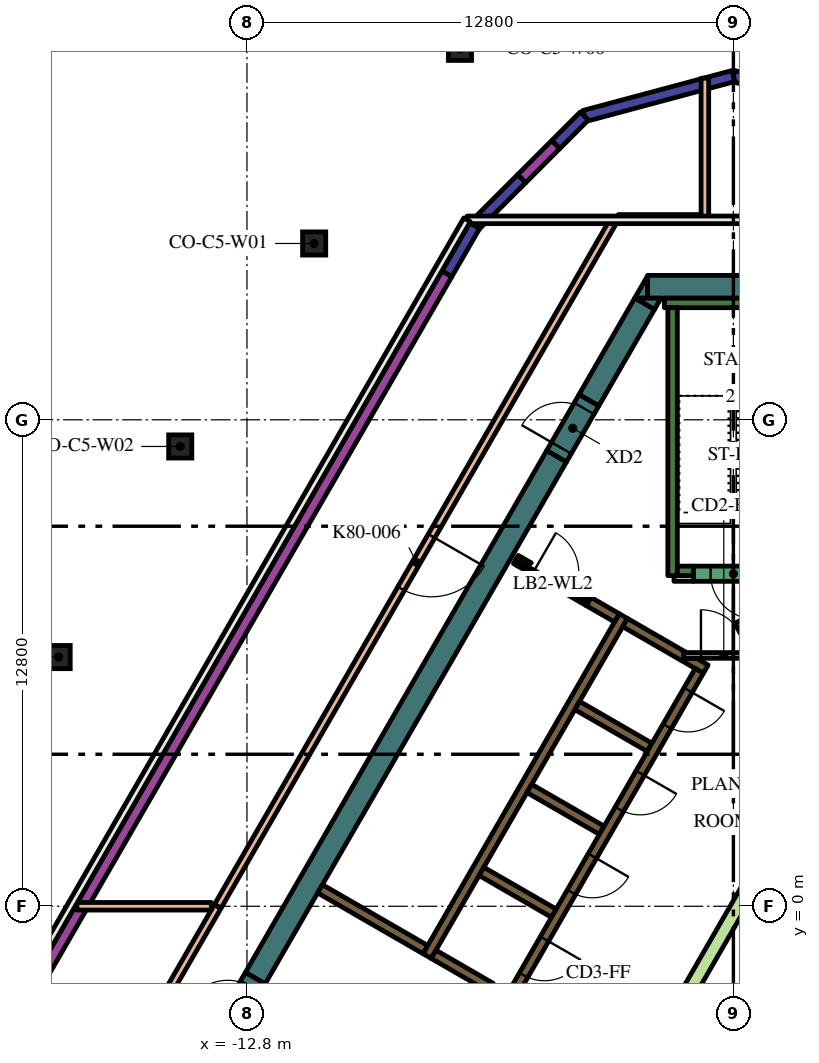
"""IFC4 building model, lengths in metres.
Left out: names, types, materials, properties, quantities, classifications, styles, units other than length and angle.
Written with IfcOpenShell. Run it as: python <this file> out.ifc"""

import sys

from ifc_helpers import new_model, si_unit, direction, frame, frame_2d, origin, origin_2d, place, context, subcontext, project, spatial, polyline, rectangle, hollow_circle, outline, extrude, element, fill, save


model = new_model("IFC4")
c1 = context("Model", 3, precision=1e-05, world=origin(), true_north=direction((0.0, 1.0)))
c2 = subcontext(c1, "Body", "Model", "MODEL_VIEW")
j1 = project(units=[si_unit("LENGTHUNIT", "METRE"), si_unit("PLANEANGLEUNIT", "RADIAN")], contexts=[c1])
p1 = place(None, origin())
s1 = spatial("IfcSite", under=j1, at=p1, CompositionType="ELEMENT")
p2 = place(p1, origin())
s2 = spatial("IfcBuilding", under=s1, at=p2, CompositionType="ELEMENT")
p3 = place(p2, frame((0.0, 0.0, 344.4)))
s3 = spatial("IfcBuildingStorey", under=s2, at=p3, CompositionType="ELEMENT", Elevation=344.4)
for number, where, z_axis, x_axis in (
    (1, (-7.195, 22.561, 0.0), (0.0, 0.0, 1.0), (1.0, 0.0, 0.0)),
    (2, (-11.032, 17.44, 0.0), (0.0, 0.0, 1.0), (1.0, 0.0, 0.0)),
    (3, (-14.556, 12.098, 0.0), (0.0, 0.0, 1.0), (1.0, 0.0, 0.0)),
    (4, (-17.756, 6.557, 0.0), (0.0, 0.0, 1.0), (1.0, 0.0, 0.0)),
):
    element("IfcColumn", number, at=place(p3, frame(where, z_axis=z_axis, x_axis=x_axis)), inside=s3, PredefinedType="COLUMN", context=c2, shape_type="SweptSolid", body=[
        extrude(hollow_circle(Radius=0.305, WallThickness=0.025, at=origin_2d()), origin(), (0.0, 0.0, 1.0), 4.2),
    ])
p4 = place(p3, frame((-2.258, 16.3, 0.0), z_axis=(0.0, 0.0, 1.0), x_axis=(1.0, 0.0, 0.0)))
e5 = element("IfcWall", 5, at=p4, inside=s3, PredefinedType="SOLIDWALL", context=c2, shape_type="SweptSolid", body=[
    extrude(rectangle(XDim=3.823, YDim=0.6, at=frame_2d((1.912, 0.0))), origin(), (0.0, 0.0, 1.0), 4.2),
])
p5 = place(p3, origin())
e6 = element("IfcWall", 6, at=p5, inside=s3, PredefinedType="SOLIDWALL", context=c2, shape_type="SweptSolid", body=[
    extrude(outline(polyline([(-2.598, 16.0), (-2.26, 16.585), (-2.26, 16.0), (-2.598, 16.0)])), origin(), (0.0, 0.0, 1.0), 4.2),
])
p6 = place(p3, frame((-2.335, 15.855, 0.0), z_axis=(0.0, 0.0, 1.0), x_axis=(-0.499960127962, -0.866048422692, 0.0)))
e7 = element("IfcWall", 7, at=p6, inside=s3, PredefinedType="SOLIDWALL", context=c2, shape_type="SweptSolid", body=[
    extrude(rectangle(XDim=2.934, YDim=0.6, at=frame_2d((1.467, 0.0))), origin(), (0.0, 0.0, 1.0), 4.2),
])
e8 = element("IfcWall", 8, at=p5, inside=s3, PredefinedType="SOLIDWALL", context=c2, shape_type="SweptSolid", body=[
    extrude(outline(polyline([(-1.905, 16.0), (-2.074, 15.707), (-2.581, 16.0), (-1.905, 16.0)])), origin(), (0.0, 0.0, 1.0), 4.2),
])
p7 = place(p3, frame((-4.652, 11.842, 0.0), z_axis=(0.0, 0.0, 1.0), x_axis=(-0.500003640647, -0.866023301845, 0.0)))
e9 = element("IfcWall", 9, at=p7, inside=s3, PredefinedType="SOLIDWALL", context=c2, shape_type="SweptSolid", body=[
    extrude(rectangle(XDim=15.858, YDim=0.6, at=frame_2d((7.929, 0.0))), origin(), (0.0, 0.0, 1.0), 4.2),
])
p8 = place(p3, frame((-1.817, 15.875, 0.0), z_axis=(0.0, 0.0, 1.0), x_axis=(1.0, 0.0, 0.0)))
e10 = element("IfcWall", 10, at=p8, inside=s3, PredefinedType="SOLIDWALL", context=c2, shape_type="SweptSolid", body=[
    extrude(rectangle(XDim=3.634, YDim=0.25, at=frame_2d((1.817, 0.0))), origin(), (0.0, 0.0, 1.0), 4.2),
])
p9 = place(p3, frame((-1.6, 8.7, 0.0), z_axis=(0.0, 0.0, 1.0), x_axis=(0.0, 1.0, 0.0)))
e11 = element("IfcWall", 11, at=p9, inside=s3, PredefinedType="SOLIDWALL", context=c2, shape_type="SweptSolid", body=[
    extrude(rectangle(XDim=7.05, YDim=0.25, at=frame_2d((3.525, 0.0))), origin(), (0.0, 0.0, 1.0), 4.2),
])
p10 = place(p3, frame((-1.475, 8.825, 0.0), z_axis=(0.0, 0.0, 1.0), x_axis=(1.0, 0.0, 0.0)))
e12 = element("IfcWall", 12, at=p10, inside=s3, PredefinedType="SOLIDWALL", context=c2, shape_type="SweptSolid", body=[
    extrude(rectangle(XDim=0.425, YDim=0.25, at=frame_2d((0.212, 0.0))), origin(), (0.0, 0.0, 1.0), 4.2),
])
p11 = place(p3, frame((3.647, 9.38, 0.0), z_axis=(0.0, 0.0, 1.0), x_axis=(-0.866027868628, -0.499995730742, 0.0)))
e13 = element("IfcWall", 13, at=p11, inside=s3, PredefinedType="SOLIDWALL", context=c2, shape_type="SweptSolid", body=[
    extrude(rectangle(XDim=4.099, YDim=0.25, at=frame_2d((2.049, 0.0))), origin(), (0.0, 0.0, 1.0), 4.2),
])
p12 = place(p3, frame((-8.06, -1.311, 0.0), z_axis=(0.0, 0.0, 1.0), x_axis=(0.50000273126, 0.866023826885, 0.0)))
e14 = element("IfcWall", 14, at=p12, inside=s3, PredefinedType="SOLIDWALL", context=c2, shape_type="SweptSolid", body=[
    extrude(rectangle(XDim=10.33, YDim=0.25, at=frame_2d((5.165, 0.0))), origin(), (0.0, 0.0, 1.0), 4.2),
])
e15 = element("IfcWall", 15, at=p5, inside=s3, PredefinedType="SOLIDWALL", context=c2, shape_type="SweptSolid", body=[
    extrude(outline(polyline([(-2.912, 7.356), (-2.787, 7.573), (-1.232, 6.675), (-1.303, 6.675), (-1.304, 6.675), (-1.304, 6.675), (-1.304, 6.525), (-1.304, 6.525), (-1.303, 6.525), (-0.971, 6.525), (-0.665, 6.348), (-0.79, 6.132), (-1.007, 6.257), (-1.007, 6.257), (-2.912, 7.356)])), origin(), (0.0, 0.0, 1.0), 4.2),
])
for number, where, z_axis, x_axis in (
    (16, (-2.204, 4.182, 0.0), (0.0, 0.0, 1.0), (-0.866, 0.5, 0.0)),
    (17, (-5.369, 3.1, 0.0), (0.0, 0.0, 1.0), (0.866, -0.5, 0.0)),
    (18, (-4.724, -0.182, 0.0), (0.0, 0.0, 1.0), (-0.866, 0.5, 0.0)),
):
    element("IfcWall", number, at=place(p3, frame(where, z_axis=z_axis, x_axis=x_axis)), inside=s3, PredefinedType="SOLIDWALL", context=c2, shape_type="SweptSolid", body=[
        extrude(rectangle(XDim=2.2, YDim=0.25, at=frame_2d((1.1, 0.0))), origin(), (0.0, 0.0, 1.0), 4.2),
    ])
p13 = place(p3, frame((-7.889, -1.265, 0.0), z_axis=(0.0, 0.0, 1.0), x_axis=(0.865986741702, -0.500066958712, 0.0)))
e19 = element("IfcWall", 19, at=p13, inside=s3, PredefinedType="SOLIDWALL", context=c2, shape_type="SweptSolid", body=[
    extrude(rectangle(XDim=1.738, YDim=0.25, at=frame_2d((0.869, 0.0))), origin(), (0.0, 0.0, 1.0), 4.2),
])
p14 = place(p3, frame((-8.106, -1.14, 0.0), z_axis=(0.0, 0.0, 1.0), x_axis=(-0.866008981251, 0.500028443584, 0.0)))
e20 = element("IfcWall", 20, at=p14, inside=s3, PredefinedType="SOLIDWALL", context=c2, shape_type="SweptSolid", body=[
    extrude(rectangle(XDim=3.2, YDim=0.25, at=frame_2d((1.6, 0.0))), origin(), (0.0, 0.0, 1.0), 4.2),
])
p15 = place(p3, frame((-5.725, 9.125, 0.0), z_axis=(0.0, 0.0, 1.0), x_axis=(0.866185586049, -0.49972245349, 0.0)))
e21 = element("IfcWall", 21, at=p15, inside=s3, PredefinedType="SOLIDWALL", context=c2, shape_type="SweptSolid", body=[
    extrude(rectangle(XDim=0.11, YDim=0.25, at=frame_2d((0.055, 0.0))), origin(), (0.0, 0.0, 1.0), 4.2),
])
p16 = place(p3, frame((-3.066, 7.59, 0.0), z_axis=(0.0, 0.0, 1.0), x_axis=(-0.866081358704, 0.49990307071, 0.0)))
e22 = element("IfcWall", 22, at=p16, inside=s3, PredefinedType="SOLIDWALL", context=c2, shape_type="SweptSolid", body=[
    extrude(rectangle(XDim=0.858, YDim=0.25, at=frame_2d((0.429, 0.0))), origin(), (0.0, 0.0, 1.0), 4.2),
])
e23 = element("IfcWall", 23, at=p5, inside=s3, PredefinedType="SOLIDWALL", context=c2, shape_type="SweptSolid", body=[
    extrude(outline(polyline([(-3.748, 8.128), (-3.813, 8.015), (-4.027, 8.139), (-4.017, 8.156), (-4.008, 8.173), (-4.0, 8.192), (-3.995, 8.21), (-3.991, 8.23), (-3.99, 8.25), (-3.99, 8.268), (-3.748, 8.128)])), origin(), (0.0, 0.0, 1.0), 4.2),
])
e24 = element("IfcWall", 24, at=p5, inside=s3, PredefinedType="SOLIDWALL", context=c2, shape_type="SweptSolid", body=[
    extrude(outline(polyline([(-5.689, 8.96), (-5.69, 8.961), (-5.565, 9.177), (-5.319, 9.035), (-5.335, 9.026), (-5.351, 9.015), (-5.366, 9.002), (-5.379, 8.988), (-5.392, 8.972), (-5.402, 8.956), (-5.412, 8.939), (-5.629, 9.064), (-5.629, 9.064), (-5.689, 8.96)])), origin(), (0.0, 0.0, 1.0), 4.2),
])
p17 = place(p3, frame((-1.564, 8.625, 0.0), z_axis=(0.0, 0.0, 1.0), x_axis=(1.0, 0.0, 0.0)))
e25 = element("IfcWall", 25, at=p17, inside=s3, PredefinedType="PARTITIONING", context=c2, shape_type="SweptSolid", body=[
    extrude(rectangle(XDim=0.514, YDim=0.15, at=frame_2d((0.257, 0.0))), origin(), (0.0, 0.0, 1.0), 3.3),
])
e26 = element("IfcWall", 26, at=p5, inside=s3, PredefinedType="PARTITIONING", context=c2, shape_type="SweptSolid", body=[
    extrude(outline(polyline([(2.017, 3.643), (2.342, 3.456), (-1.822, -3.756), (-2.147, -3.568), (2.017, 3.643)])), origin(), (0.0, 0.0, 1.0), 3.3),
])
p18 = place(p3, frame((-0.898, 6.194, 0.0), z_axis=(0.0, 0.0, 1.0), x_axis=(-0.499996202215, -0.866027596426, 0.0)))
e27 = element("IfcWall", 27, at=p18, inside=s3, PredefinedType="SOLIDWALL", context=c2, shape_type="SweptSolid", body=[
    extrude(rectangle(XDim=9.83, YDim=0.25, at=frame_2d((4.915, 0.0))), origin(), (0.0, 0.0, 1.0), 4.2),
])
p19 = place(p18, frame((0.585, 0.0, 0.0)))
e28 = element("IfcOpeningElement", 28, at=p19, cuts=e27, PredefinedType="OPENING", context=c2, shape_type="SweptSolid", body=[
    extrude(rectangle(XDim=1.1, YDim=2.1, at=frame_2d((0.55, 1.05))), frame((0.0, 0.135, 0.0), z_axis=(0.0, -1.0, 0.0), x_axis=(1.0, 0.0, 0.0)), (0.0, 0.0, 1.0), 0.27),
])
p20 = place(p18, frame((3.105, 0.0, 0.0)))
e29 = element("IfcOpeningElement", 29, at=p20, cuts=e27, PredefinedType="OPENING", context=c2, shape_type="SweptSolid", body=[
    extrude(rectangle(XDim=1.1, YDim=2.1, at=frame_2d((0.55, 1.05))), frame((0.0, 0.135, 0.0), z_axis=(0.0, -1.0, 0.0), x_axis=(1.0, 0.0, 0.0)), (0.0, 0.0, 1.0), 0.27),
])
p21 = place(p18, frame((5.625, 0.0, 0.0)))
e30 = element("IfcOpeningElement", 30, at=p21, cuts=e27, PredefinedType="OPENING", context=c2, shape_type="SweptSolid", body=[
    extrude(rectangle(XDim=1.1, YDim=2.1, at=frame_2d((0.55, 1.05))), frame((0.0, 0.135, 0.0), z_axis=(0.0, -1.0, 0.0), x_axis=(1.0, 0.0, 0.0)), (0.0, 0.0, 1.0), 0.27),
])
p22 = place(p18, frame((8.145, 0.0, 0.0)))
e31 = element("IfcOpeningElement", 31, at=p22, cuts=e27, PredefinedType="OPENING", context=c2, shape_type="SweptSolid", body=[
    extrude(rectangle(XDim=1.1, YDim=2.1, at=frame_2d((0.55, 1.05))), frame((0.0, 0.135, 0.0), z_axis=(0.0, -1.0, 0.0), x_axis=(1.0, 0.0, 0.0)), (0.0, 0.0, 1.0), 0.27),
])
p23 = place(p3, frame((1.05, 8.75, 0.0), z_axis=(0.0, 0.0, 1.0), x_axis=(-1.0, 0.0, 0.0)))
e32 = element("IfcWall", 32, at=p23, inside=s3, PredefinedType="SOLIDWALL", context=c2, shape_type="SweptSolid", body=[
    extrude(rectangle(XDim=2.1, YDim=0.4, at=frame_2d((1.05, 0.0))), origin(), (0.0, 0.0, 1.0), 4.2),
])
p24 = place(p23, frame((0.45, 0.0, 0.0)))
e33 = element("IfcOpeningElement", 33, at=p24, cuts=e32, PredefinedType="OPENING", context=c2, shape_type="SweptSolid", body=[
    extrude(rectangle(XDim=1.2, YDim=2.1, at=frame_2d((0.6, 1.05))), frame((0.0, 0.21, 0.0), z_axis=(0.0, -1.0, 0.0), x_axis=(1.0, 0.0, 0.0)), (0.0, 0.0, 1.0), 0.42),
])
p25 = place(p3, frame((-1.303, 6.6, 0.0), z_axis=(0.0, 0.0, 1.0), x_axis=(1.0, 0.0, 0.0)))
e34 = element("IfcWall", 34, at=p25, inside=s3, PredefinedType="PARTITIONING", context=c2, shape_type="SweptSolid", body=[
    extrude(rectangle(XDim=2.1, YDim=0.15, at=frame_2d((1.05, 0.0))), origin(), (0.0, 0.0, 1.0), 4.2),
])
p26 = place(p25, frame((0.45, 0.0, 0.0)))
e35 = element("IfcOpeningElement", 35, at=p26, cuts=e34, PredefinedType="OPENING", context=c2, shape_type="SweptSolid", body=[
    extrude(rectangle(XDim=1.2, YDim=2.1, at=frame_2d((0.6, 1.05))), frame((0.0, 0.085, 0.0), z_axis=(0.0, -1.0, 0.0), x_axis=(1.0, 0.0, 0.0)), (0.0, 0.0, 1.0), 0.17),
])
p27 = place(p3, frame((-5.659, 9.012, 0.0), z_axis=(0.0, 0.0, 1.0), x_axis=(0.866009402589, -0.500027713859, 0.0)))
e36 = element("IfcWall", 36, at=p27, inside=s3, PredefinedType="PARTITIONING", context=c2, shape_type="SweptSolid", body=[
    extrude(rectangle(XDim=2.1, YDim=0.12, at=frame_2d((1.05, 0.0))), origin(), (0.0, 0.0, 1.0), 3.3),
])
p28 = place(p27, frame((0.45, 0.0, 0.0)))
e37 = element("IfcOpeningElement", 37, at=p28, cuts=e36, PredefinedType="OPENING", context=c2, shape_type="SweptSolid", body=[
    extrude(rectangle(XDim=1.2, YDim=2.1, at=frame_2d((0.6, 1.05))), frame((0.0, 0.07, 0.0), z_axis=(0.0, -1.0, 0.0), x_axis=(1.0, 0.0, 0.0)), (0.0, 0.0, 1.0), 0.14),
])
p29 = place(p3, frame((-4.652, 11.842, 0.0), z_axis=(0.0, 0.0, 1.0), x_axis=(0.500062241894, 0.865989465428, 0.0)))
e38 = element("IfcWall", 38, at=p29, inside=s3, PredefinedType="SOLIDWALL", context=c2, shape_type="SweptSolid", body=[
    extrude(rectangle(XDim=1.7, YDim=0.6, at=frame_2d((0.85, 0.0))), origin(), (0.0, 0.0, 1.0), 4.2),
])
p30 = place(p29, frame((0.25, 0.0, 0.0)))
e39 = element("IfcOpeningElement", 39, at=p30, cuts=e38, PredefinedType="OPENING", context=c2, shape_type="SweptSolid", body=[
    extrude(rectangle(XDim=1.2, YDim=2.1, at=frame_2d((0.6, 1.05))), frame((0.0, 0.31, 0.0), z_axis=(0.0, -1.0, 0.0), x_axis=(1.0, 0.0, 0.0)), (0.0, 0.0, 1.0), 0.62),
])
p31 = place(p3, frame((-13.432, -3.364, 0.0), z_axis=(0.0, 0.0, 1.0), x_axis=(0.500000056704, 0.866025371046, 0.0)))
e40 = element("IfcWall", 40, at=p31, inside=s3, PredefinedType="SOLIDWALL", context=c2, shape_type="SweptSolid", body=[
    extrude(rectangle(XDim=1.7, YDim=0.6, at=frame_2d((0.85, 0.0))), origin(), (0.0, 0.0, 1.0), 4.2),
])
p32 = place(p31, frame((0.25, 0.0, 0.0)))
e41 = element("IfcOpeningElement", 41, at=p32, cuts=e40, PredefinedType="OPENING", context=c2, shape_type="SweptSolid", body=[
    extrude(rectangle(XDim=1.2, YDim=2.1, at=frame_2d((0.6, 1.05))), frame((0.0, 0.31, 0.0), z_axis=(0.0, -1.0, 0.0), x_axis=(1.0, 0.0, 0.0)), (0.0, 0.0, 1.0), 0.62),
])
p33 = place(p3, frame((-3.118, 18.1, 0.0), z_axis=(0.0, 0.0, 1.0), x_axis=(-0.499998496574, -0.866026271786, 0.0)))
e42 = element("IfcWall", 42, at=p33, inside=s3, PredefinedType="PARTITIONING", context=c2, shape_type="SweptSolid", body=[
    extrude(rectangle(XDim=20.9, YDim=0.2, at=frame_2d((10.45, 0.0))), origin(), (0.0, 0.0, 1.0), 3.3),
])
p34 = place(p33, frame((9.65, 0.0, 0.0)))
e43 = element("IfcOpeningElement", 43, at=p34, cuts=e42, PredefinedType="OPENING", context=c2, shape_type="SweptSolid", body=[
    extrude(rectangle(XDim=1.6, YDim=2.1, at=frame_2d((0.8, 1.05))), frame((0.0, 0.11, 0.0), z_axis=(0.0, -1.0, 0.0), x_axis=(1.0, 0.0, 0.0)), (0.0, 0.0, 1.0), 0.22),
])
p35 = place(p3, frame((-13.573, -0.009, 0.0), z_axis=(0.0, 0.0, 1.0), x_axis=(-0.50000817069, -0.866020686383, 0.0)))
e44 = element("IfcWall", 44, at=p35, inside=s3, PredefinedType="PARTITIONING", context=c2, shape_type="SweptSolid", body=[
    extrude(rectangle(XDim=7.323, YDim=0.2, at=frame_2d((3.661, 0.0))), origin(), (0.0, 0.0, 1.0), 3.3),
])
p36 = place(p35, frame((3.061, 0.0, 0.0)))
e45 = element("IfcOpeningElement", 45, at=p36, cuts=e44, PredefinedType="OPENING", context=c2, shape_type="SweptSolid", body=[
    extrude(rectangle(XDim=1.2, YDim=2.1, at=frame_2d((0.6, 1.05))), frame((0.0, 0.11, 0.0), z_axis=(0.0, -1.0, 0.0), x_axis=(1.0, 0.0, 0.0)), (0.0, 0.0, 1.0), 0.22),
])
p37 = place(p3, frame((-17.274, 0.0, 0.0), z_axis=(0.0, 0.0, 1.0), x_axis=(1.0, 0.0, 0.0)))
e46 = element("IfcWall", 46, at=p37, inside=s3, PredefinedType="PARTITIONING", context=c2, shape_type="SweptSolid", body=[
    extrude(rectangle(XDim=3.536, YDim=0.2, at=frame_2d((1.768, 0.0))), origin(), (0.0, 0.0, 1.0), 3.3),
])
p38 = place(p3, frame((-0.75, 18.1, 0.0), z_axis=(0.0, 0.0, 1.0), x_axis=(0.0, 1.0, 0.0)))
e47 = element("IfcWall", 47, at=p38, inside=s3, PredefinedType="PARTITIONING", context=c2, shape_type="SweptSolid", body=[
    extrude(rectangle(XDim=3.688, YDim=0.2, at=frame_2d((1.844, 0.0))), origin(), (0.0, 0.0, 1.0), 3.3),
])
p39 = place(p3, frame((-3.028, 18.1, 0.0), z_axis=(0.0, 0.0, 1.0), x_axis=(1.0, 0.0, 0.0)))
e48 = element("IfcWall", 48, at=p39, inside=s3, PredefinedType="PARTITIONING", context=c2, shape_type="SweptSolid", body=[
    extrude(rectangle(XDim=2.177, YDim=0.2, at=frame_2d((1.089, 0.0))), origin(), (0.0, 0.0, 1.0), 3.3),
])
for number, where, z_axis, x_axis in (
    (49, (3.922, 20.794, 0.0), (0.0, 0.0, 1.0), (-0.966, 0.259, 0.0)),
    (50, (0.0, 21.845, 0.0), (0.0, 0.0, 1.0), (-0.966, -0.259, 0.0)),
):
    element("IfcWall", number, at=place(p3, frame(where, z_axis=z_axis, x_axis=x_axis)), inside=s3, PredefinedType="SOLIDWALL", context=c2, shape_type="SweptSolid", body=[
        extrude(rectangle(XDim=4.061, YDim=0.3, at=frame_2d((2.03, 0.0))), origin(), (0.0, 0.0, 1.0), 3.8),
    ])
p40 = place(p3, frame((-3.922, 20.794, 0.0), z_axis=(0.0, 0.0, 1.0), x_axis=(-0.707106781187, -0.707106781187, 0.0)))
e51 = element("IfcWall", 51, at=p40, inside=s3, PredefinedType="SOLIDWALL", context=c2, shape_type="SweptSolid", body=[
    extrude(rectangle(XDim=1.065, YDim=0.3, at=frame_2d((0.532, 0.0))), origin(), (0.0, 0.0, 1.0), 3.8),
])
p41 = place(p3, frame((-4.675, 20.041, 0.0), z_axis=(0.0, 0.0, 1.0), x_axis=(-0.707106781187, -0.707106781187, 0.0)))
e52 = element("IfcWall", 52, at=p41, inside=s3, PredefinedType="SOLIDWALL", context=c2, shape_type="SweptSolid", body=[
    extrude(rectangle(XDim=1.264, YDim=0.3, at=frame_2d((0.632, 0.0))), origin(), (0.0, 0.0, 1.0), 3.3),
])
p42 = place(p3, frame((-5.569, 19.147, 0.0), z_axis=(0.0, 0.0, 1.0), x_axis=(-0.707106781187, -0.707106781187, 0.0)))
e53 = element("IfcWall", 53, at=p42, inside=s3, PredefinedType="SOLIDWALL", context=c2, shape_type="SweptSolid", body=[
    extrude(rectangle(XDim=1.752, YDim=0.3, at=frame_2d((0.876, 0.0))), origin(), (0.0, 0.0, 1.0), 3.8),
])
p43 = place(p3, frame((-6.808, 17.908, 0.0), z_axis=(0.0, 0.0, 1.0), x_axis=(-0.499977492351, -0.866038398192, 0.0)))
e54 = element("IfcWall", 54, at=p43, inside=s3, PredefinedType="SOLIDWALL", context=c2, shape_type="SweptSolid", body=[
    extrude(rectangle(XDim=1.464, YDim=0.3, at=frame_2d((0.732, 0.0))), origin(), (0.0, 0.0, 1.0), 3.8),
])
p44 = place(p3, frame((-7.54, 16.64, 0.0), z_axis=(0.0, 0.0, 1.0), x_axis=(-0.500002158106, -0.866024157798, 0.0)))
e55 = element("IfcWall", 55, at=p44, inside=s3, PredefinedType="SOLIDWALL", context=c2, shape_type="SweptSolid", body=[
    extrude(rectangle(XDim=21.282, YDim=0.3, at=frame_2d((10.641, 0.0))), origin(), (0.0, 0.0, 1.0), 3.3),
])
p45 = place(p19, origin())
e56 = element("IfcDoor", 56, at=p45, inside=s3, OperationType="DOUBLE_DOOR_SLIDING", PredefinedType="DOOR", context=c2, shape_type="SweptSolid", body=[
    extrude(rectangle(XDim=1.1, YDim=2.1, at=frame_2d((0.55, 1.05))), frame((0.0, 0.025, 0.0), z_axis=(0.0, -1.0, 0.0), x_axis=(1.0, 0.0, 0.0)), (0.0, 0.0, 1.0), 0.05),
])
fill(e28, e56)
p46 = place(p20, origin())
e57 = element("IfcDoor", 57, at=p46, inside=s3, OperationType="DOUBLE_DOOR_SLIDING", PredefinedType="DOOR", context=c2, shape_type="SweptSolid", body=[
    extrude(rectangle(XDim=1.1, YDim=2.1, at=frame_2d((0.55, 1.05))), frame((0.0, 0.025, 0.0), z_axis=(0.0, -1.0, 0.0), x_axis=(1.0, 0.0, 0.0)), (0.0, 0.0, 1.0), 0.05),
])
fill(e29, e57)
p47 = place(p21, origin())
e58 = element("IfcDoor", 58, at=p47, inside=s3, OperationType="DOUBLE_DOOR_SLIDING", PredefinedType="DOOR", context=c2, shape_type="SweptSolid", body=[
    extrude(rectangle(XDim=1.1, YDim=2.1, at=frame_2d((0.55, 1.05))), frame((0.0, 0.025, 0.0), z_axis=(0.0, -1.0, 0.0), x_axis=(1.0, 0.0, 0.0)), (0.0, 0.0, 1.0), 0.05),
])
fill(e30, e58)
p48 = place(p22, origin())
e59 = element("IfcDoor", 59, at=p48, inside=s3, OperationType="DOUBLE_DOOR_SLIDING", PredefinedType="DOOR", context=c2, shape_type="SweptSolid", body=[
    extrude(rectangle(XDim=1.1, YDim=2.1, at=frame_2d((0.55, 1.05))), frame((0.0, 0.025, 0.0), z_axis=(0.0, -1.0, 0.0), x_axis=(1.0, 0.0, 0.0)), (0.0, 0.0, 1.0), 0.05),
])
fill(e31, e59)
p49 = place(p24, origin())
e60 = element("IfcDoor", 60, at=p49, inside=s3, OperationType="SINGLE_SWING_LEFT", PredefinedType="DOOR", context=c2, shape_type="SweptSolid", body=[
    extrude(rectangle(XDim=1.2, YDim=2.1, at=frame_2d((0.6, 1.05))), frame((0.0, 0.025, 0.0), z_axis=(0.0, -1.0, 0.0), x_axis=(1.0, 0.0, 0.0)), (0.0, 0.0, 1.0), 0.05),
])
fill(e33, e60)
p50 = place(p26, origin())
e61 = element("IfcDoor", 61, at=p50, inside=s3, OperationType="SINGLE_SWING_LEFT", PredefinedType="DOOR", context=c2, shape_type="SweptSolid", body=[
    extrude(rectangle(XDim=1.2, YDim=2.1, at=frame_2d((0.6, 1.05))), frame((0.0, 0.025, 0.0), z_axis=(0.0, -1.0, 0.0), x_axis=(1.0, 0.0, 0.0)), (0.0, 0.0, 1.0), 0.05),
])
fill(e35, e61)
p51 = place(p28, origin())
e62 = element("IfcDoor", 62, at=p51, inside=s3, OperationType="SINGLE_SWING_LEFT", PredefinedType="DOOR", context=c2, shape_type="SweptSolid", body=[
    extrude(rectangle(XDim=1.2, YDim=2.1, at=frame_2d((0.6, 1.05))), frame((0.0, 0.025, 0.0), z_axis=(0.0, -1.0, 0.0), x_axis=(1.0, 0.0, 0.0)), (0.0, 0.0, 1.0), 0.05),
])
fill(e37, e62)
p52 = place(p30, origin())
e63 = element("IfcDoor", 63, at=p52, inside=s3, OperationType="SINGLE_SWING_LEFT", PredefinedType="DOOR", context=c2, shape_type="SweptSolid", body=[
    extrude(rectangle(XDim=1.2, YDim=2.1, at=frame_2d((0.6, 1.05))), frame((0.0, 0.025, 0.0), z_axis=(0.0, -1.0, 0.0), x_axis=(1.0, 0.0, 0.0)), (0.0, 0.0, 1.0), 0.05),
])
fill(e39, e63)
p53 = place(p34, origin())
e64 = element("IfcDoor", 64, at=p53, inside=s3, OperationType="DOUBLE_DOOR_SINGLE_SWING", PredefinedType="DOOR", context=c2, shape_type="SweptSolid", body=[
    extrude(rectangle(XDim=1.6, YDim=2.1, at=frame_2d((0.8, 1.05))), frame((0.0, 0.025, 0.0), z_axis=(0.0, -1.0, 0.0), x_axis=(1.0, 0.0, 0.0)), (0.0, 0.0, 1.0), 0.05),
])
fill(e43, e64)
p54 = place(p2, frame((0.0, 0.0, 348.6)))
p55 = place(p54, origin())
p56 = place(p55, frame((0.0, 12.35, 0.0)))
p57 = place(p56, frame((0.0, 0.0, 1.15)))
e65 = element("IfcWindow", 65, at=p57, inside=s3, PartitioningType="SINGLE_PANEL", PredefinedType="WINDOW", context=c2, shape_type="SweptSolid", body=[
    extrude(rectangle(XDim=2.95, YDim=6.8, at=origin_2d()), origin(), (0.0, 0.0, 1.0), 0.05),
])
save(model, sys.argv[1])
